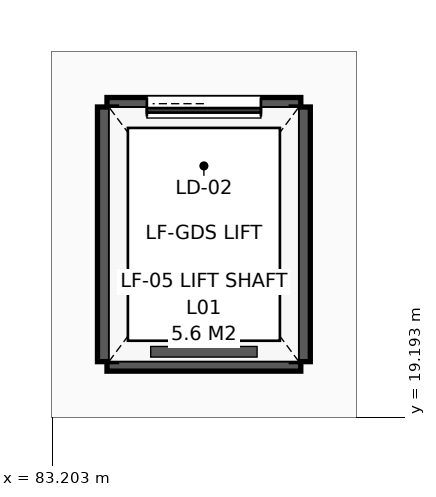
"""IFC4 building model, lengths in metres.
Left out: names, types, materials, properties, quantities, classifications, styles, units other than length and angle.
Written with IfcOpenShell. Run it as: python <this file> out.ifc"""

import sys

from ifc_helpers import new_model, si_unit, direction, frame, frame_2d, origin, place, context, subcontext, project, spatial, rectangle, extrude, element, fill, save


model = new_model("IFC4")
c1 = context("Model", 3, precision=1e-05, world=origin(), true_north=direction((0.0, 1.0)))
c2 = subcontext(c1, "Body", "Model", "MODEL_VIEW")
j1 = project(units=[si_unit("LENGTHUNIT", "METRE"), si_unit("PLANEANGLEUNIT", "RADIAN")], contexts=[c1])
p1 = place(None, origin())
s1 = spatial("IfcSite", under=j1, at=p1, CompositionType="ELEMENT")
p2 = place(p1, origin())
s2 = spatial("IfcBuilding", under=s1, at=p2, CompositionType="ELEMENT")
p3 = place(p2, frame((0.0, 0.0, 4.8)))
s3 = spatial("IfcBuildingStorey", under=s2, at=p3, CompositionType="ELEMENT", Elevation=4.8)
p4 = place(p3, frame((83.925, 19.925, 0.0), z_axis=(0.0, 0.0, 1.0), x_axis=(1.0, 0.0, 0.0)))
e1 = element("IfcWall", 1, at=p4, inside=s3, PredefinedType="SHEAR", context=c2, shape_type="SweptSolid", body=[
    extrude(rectangle(XDim=2.55, YDim=0.25, at=frame_2d((1.275, 0.0))), origin(), (0.0, 0.0, 1.0), 3.9),
])
p5 = place(p3, frame((86.475, 23.275, 0.0), z_axis=(0.0, 0.0, 1.0), x_axis=(-1.0, 0.0, 0.0)))
e2 = element("IfcWall", 2, at=p5, inside=s3, PredefinedType="SHEAR", context=c2, shape_type="SweptSolid", body=[
    extrude(rectangle(XDim=2.55, YDim=0.25, at=frame_2d((1.275, 0.0))), origin(), (0.0, 0.0, 1.0), 3.9),
])
p6 = place(p5, frame((0.525, 0.0, 0.0)))
e3 = element("IfcOpeningElement", 3, at=p6, cuts=e2, PredefinedType="OPENING", context=c2, shape_type="SweptSolid", body=[
    extrude(rectangle(XDim=1.5, YDim=2.2, at=frame_2d((0.75, 1.1))), frame((0.0, 0.135, 0.0), z_axis=(0.0, -1.0, 0.0), x_axis=(1.0, 0.0, 0.0)), (0.0, 0.0, 1.0), 0.27),
])
for number, where, z_axis, x_axis in (
    (4, (83.925, 23.275, 0.0), (0.0, 0.0, 1.0), (0.0, -1.0, 0.0)),
    (5, (86.475, 19.925, 0.0), (0.0, 0.0, 1.0), (0.0, 1.0, 0.0)),
):
    element("IfcWall", number, at=place(p3, frame(where, z_axis=z_axis, x_axis=x_axis)), inside=s3, PredefinedType="SHEAR", context=c2, shape_type="SweptSolid", body=[
        extrude(rectangle(XDim=3.35, YDim=0.25, at=frame_2d((1.675, 0.0))), origin(), (0.0, 0.0, 1.0), 3.9),
    ])
p7 = place(p6, origin())
e6 = element("IfcDoor", 6, at=p7, inside=s3, OperationType="SLIDING_TO_RIGHT", PredefinedType="DOOR", context=c2, shape_type="SweptSolid", body=[
    extrude(rectangle(XDim=1.5, YDim=2.2, at=frame_2d((0.75, 1.1))), frame((0.0, 0.025, 0.0), z_axis=(0.0, -1.0, 0.0), x_axis=(1.0, 0.0, 0.0)), (0.0, 0.0, 1.0), 0.05),
])
fill(e3, e6)
save(model, sys.argv[1])
